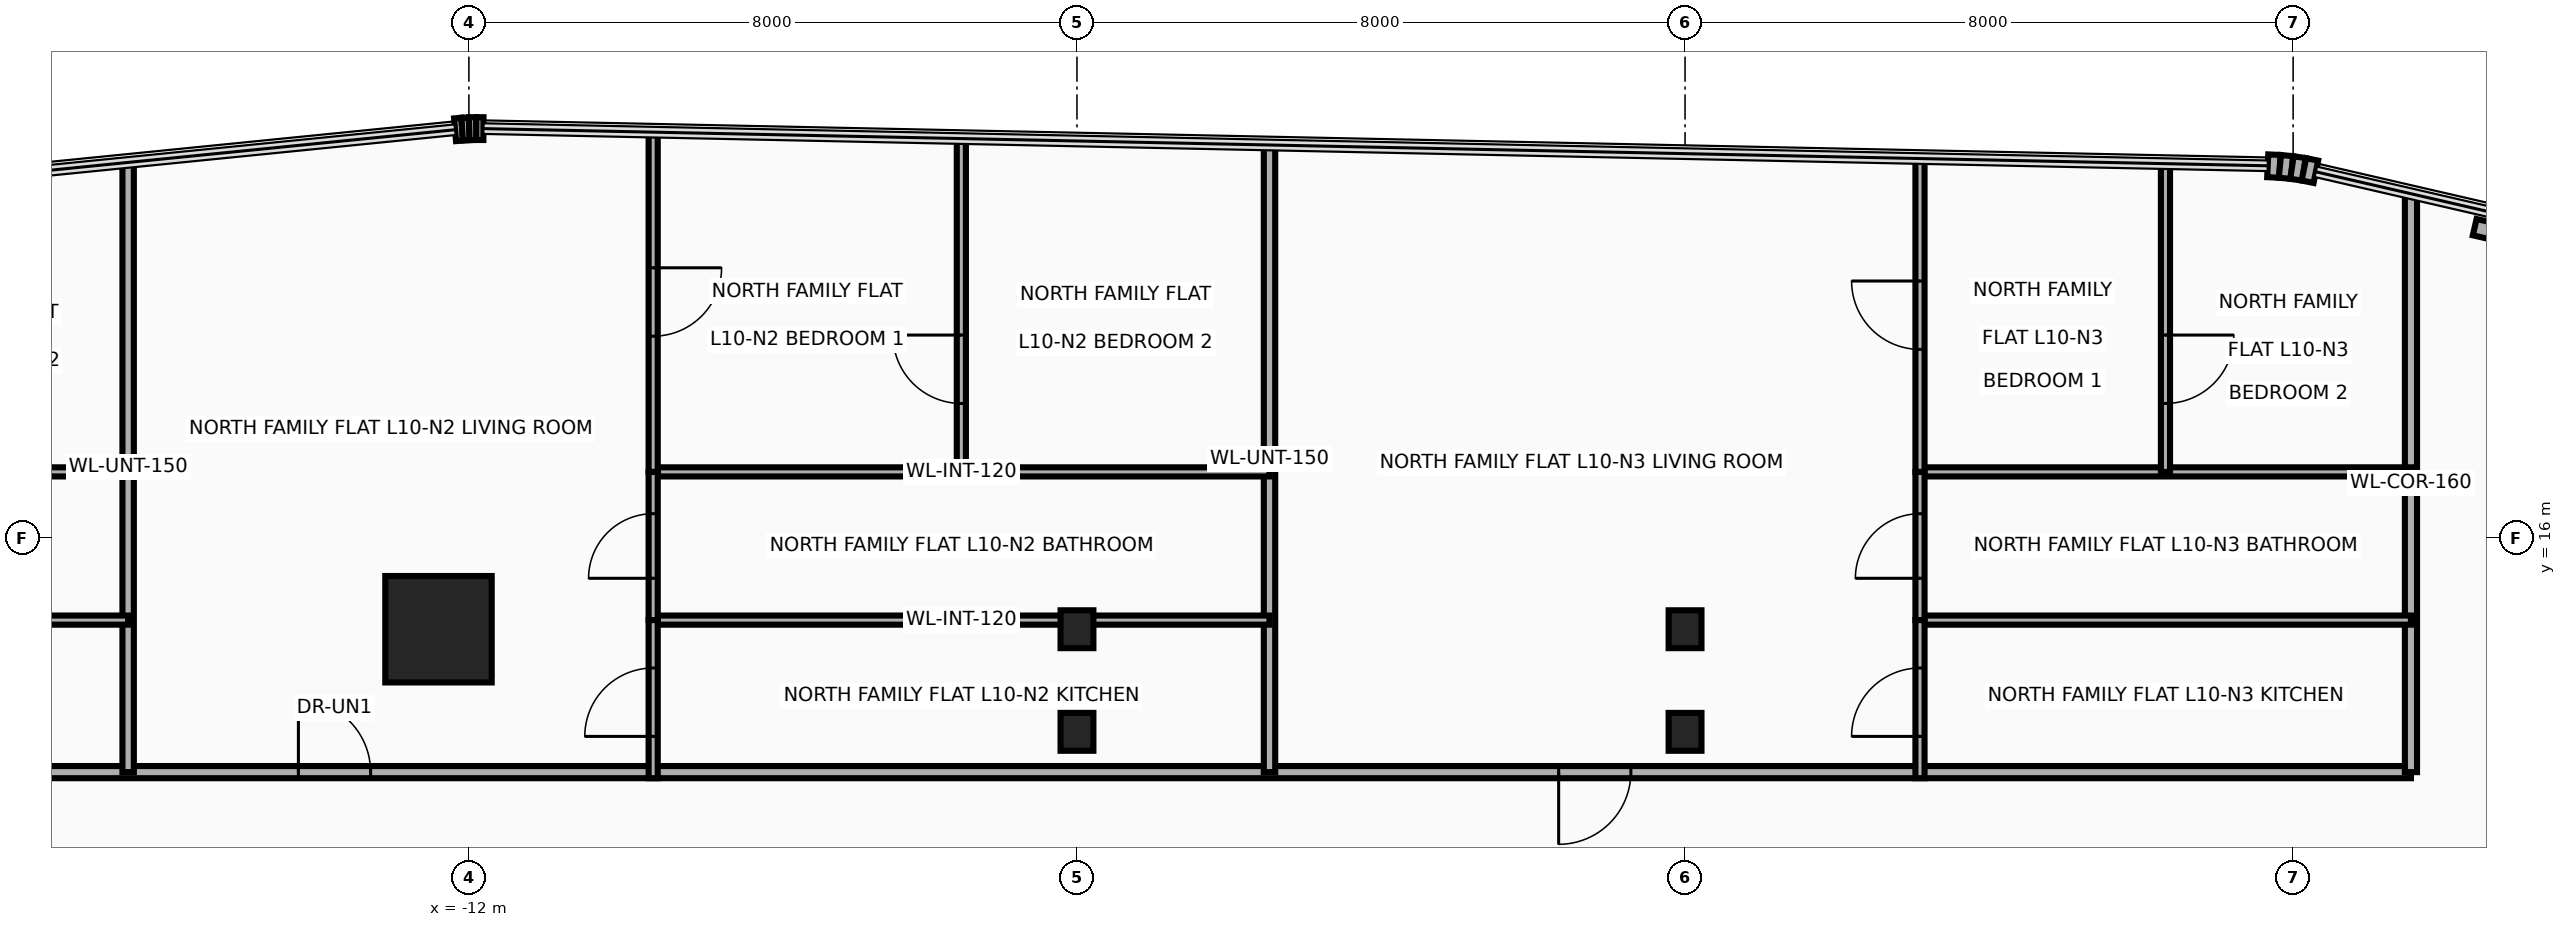
"""IFC4 building model, lengths in metres.
Left out: names, types, materials, properties, quantities, classifications, styles, units other than length and angle.
Written with IfcOpenShell. Run it as: python <this file> out.ifc"""

import sys

from ifc_helpers import new_model, si_unit, direction, frame, frame_2d, origin, origin_2d, place, context, subcontext, project, spatial, rectangle, i_section, extrude, source, transform, mapped, element, fill, save


model = new_model("IFC4")
c1 = context("Model", 3, precision=1e-05, world=origin(), true_north=direction((0.0, 1.0)))
c2 = subcontext(c1, "Body", "Model", "MODEL_VIEW")
j1 = project(units=[si_unit("LENGTHUNIT", "METRE"), si_unit("PLANEANGLEUNIT", "RADIAN")], contexts=[c1])
p1 = place(None, origin())
s1 = spatial("IfcSite", under=j1, at=p1, CompositionType="ELEMENT")
p2 = place(p1, origin())
s2 = spatial("IfcBuilding", under=s1, at=p2, CompositionType="ELEMENT")
p3 = place(p2, frame((0.0, 0.0, 44.5)))
s3 = spatial("IfcBuildingStorey", under=s2, at=p3, CompositionType="ELEMENT", Elevation=44.5)
m1 = source(origin(), c2, "Body", "SweptSolid", [
    extrude(rectangle(XDim=1.4, YDim=1.4, at=origin_2d()), origin(), (0.0, 0.0, 1.0), 3.7),
])
p4 = place(p3, frame((-12.4, 14.8, 0.0), z_axis=(0.0, 0.0, 1.0), x_axis=(1.0, 0.0, 0.0)))
e1 = element("IfcColumn", 1, at=p4, inside=s3, PredefinedType="COLUMN", context=c2, shape_type="MappedRepresentation", body=[
    mapped(m1, transform((0.0, 0.0, 0.0), x_axis=(1.0, 0.0, 0.0), y_axis=(0.0, 1.0, 0.0), z_axis=(0.0, 0.0, 1.0), scale=1.0)),
])
m2 = source(origin(), c2, "Body", "SweptSolid", [
    extrude(i_section(OverallWidth=0.432, OverallDepth=0.498, WebThickness=0.056, FlangeThickness=0.089, at=origin_2d()), origin(), (0.0, 0.0, 1.0), 3.7),
])
for number, where, z_axis, x_axis in (
    (2, (-4.0, 13.45, 0.0), (0.0, 0.0, 1.0), (1.0, 0.0, 0.0)),
    (3, (-4.0, 14.8, 0.0), (0.0, 0.0, 1.0), (1.0, 0.0, 0.0)),
    (4, (4.0, 13.45, 0.0), (0.0, 0.0, 1.0), (1.0, 0.0, 0.0)),
    (5, (4.0, 14.8, 0.0), (0.0, 0.0, 1.0), (1.0, 0.0, 0.0)),
):
    element("IfcColumn", number, at=place(p3, frame(where, z_axis=z_axis, x_axis=x_axis)), inside=s3, PredefinedType="COLUMN", context=c2, shape_type="MappedRepresentation", body=[
        mapped(m2, transform((0.0, 0.0, 0.0), x_axis=(1.0, 0.0, 0.0), y_axis=(0.0, 1.0, 0.0), z_axis=(0.0, 0.0, 1.0), scale=1.0)),
    ])
p5 = place(p3, frame((-12.182, 21.371, 0.0), z_axis=(0.0, 0.0, 1.0), x_axis=(0.996527790842, 0.08326080759, 0.0)))
e6 = element("IfcWall", 6, at=p5, inside=s3, PredefinedType="SOLIDWALL", context=c2, shape_type="SweptSolid", body=[
    extrude(rectangle(XDim=0.094, YDim=0.3, at=frame_2d((0.047, 0.0))), origin(), (0.0, 0.0, 1.0), 3.46),
])
p6 = place(p3, frame((-12.088, 21.379, 0.0), z_axis=(0.0, 0.0, 1.0), x_axis=(0.998476480444, 0.055178963393, 0.0)))
e7 = element("IfcWall", 7, at=p6, inside=s3, PredefinedType="SOLIDWALL", context=c2, shape_type="SweptSolid", body=[
    extrude(rectangle(XDim=0.093, YDim=0.3, at=frame_2d((0.046, 0.0))), origin(), (0.0, 0.0, 1.0), 3.46),
])
p7 = place(p3, frame((-11.996, 21.384, 0.0), z_axis=(0.0, 0.0, 1.0), x_axis=(0.999722573757, 0.023553673204, 0.0)))
e8 = element("IfcWall", 8, at=p7, inside=s3, PredefinedType="SOLIDWALL", context=c2, shape_type="SweptSolid", body=[
    extrude(rectangle(XDim=0.093, YDim=0.3, at=frame_2d((0.047, 0.0))), origin(), (0.0, 0.0, 1.0), 3.46),
])
p8 = place(p3, frame((-11.902, 21.386, 0.0), z_axis=(0.0, 0.0, 1.0), x_axis=(0.999986507273, -0.005194735103, 0.0)))
e9 = element("IfcWall", 9, at=p8, inside=s3, PredefinedType="SOLIDWALL", context=c2, shape_type="SweptSolid", body=[
    extrude(rectangle(XDim=0.094, YDim=0.3, at=frame_2d((0.047, 0.0))), origin(), (0.0, 0.0, 1.0), 3.46),
])
p9 = place(p3, frame((11.666, 20.897, 0.0), z_axis=(0.0, 0.0, 1.0), x_axis=(0.998885297239, -0.047203421059, 0.0)))
e10 = element("IfcWall", 10, at=p9, inside=s3, PredefinedType="SOLIDWALL", context=c2, shape_type="SweptSolid", body=[
    extrude(rectangle(XDim=0.16, YDim=0.3, at=frame_2d((0.08, 0.0))), origin(), (0.0, 0.0, 1.0), 3.46),
])
p10 = place(p3, frame((11.826, 20.889, 0.0), z_axis=(0.0, 0.0, 1.0), x_axis=(0.995172891136, -0.098137234257, 0.0)))
e11 = element("IfcWall", 11, at=p10, inside=s3, PredefinedType="SOLIDWALL", context=c2, shape_type="SweptSolid", body=[
    extrude(rectangle(XDim=0.159, YDim=0.3, at=frame_2d((0.08, 0.0))), origin(), (0.0, 0.0, 1.0), 3.46),
])
p11 = place(p3, frame((11.984, 20.874, 0.0), z_axis=(0.0, 0.0, 1.0), x_axis=(0.988846069207, -0.148941100486, 0.0)))
e12 = element("IfcWall", 12, at=p11, inside=s3, PredefinedType="SOLIDWALL", context=c2, shape_type="SweptSolid", body=[
    extrude(rectangle(XDim=0.159, YDim=0.3, at=frame_2d((0.08, 0.0))), origin(), (0.0, 0.0, 1.0), 3.46),
])
p12 = place(p3, frame((12.142, 20.85, 0.0), z_axis=(0.0, 0.0, 1.0), x_axis=(0.979991950448, -0.19903712482, 0.0)))
e13 = element("IfcWall", 13, at=p12, inside=s3, PredefinedType="SOLIDWALL", context=c2, shape_type="SweptSolid", body=[
    extrude(rectangle(XDim=0.161, YDim=0.3, at=frame_2d((0.08, 0.0))), origin(), (0.0, 0.0, 1.0), 3.46),
])
p13 = place(p3, frame((14.389, 20.09, 0.0), z_axis=(0.0, 0.0, 1.0), x_axis=(0.974400545997, -0.224818984875, 0.0)))
e14 = element("IfcWall", 14, at=p13, inside=s3, PredefinedType="SOLIDWALL", context=c2, shape_type="SweptSolid", body=[
    extrude(rectangle(XDim=2.2, YDim=0.22, at=frame_2d((1.1, 0.0))), origin(), (0.0, 0.0, 1.0), 3.46),
])
p14 = place(p13, frame((0.65, 0.0, 0.95)))
e15 = element("IfcOpeningElement", 15, at=p14, cuts=e14, PredefinedType="OPENING", context=c2, shape_type="SweptSolid", body=[
    extrude(rectangle(XDim=0.9, YDim=1.3, at=frame_2d((0.45, 0.65))), frame((0.0, 0.125, 0.0), z_axis=(0.0, -1.0, 0.0), x_axis=(1.0, 0.0, 0.0)), (0.0, 0.0, 1.0), 0.25),
])
p15 = place(p3, frame((-31.89, 12.92, 0.0), z_axis=(0.0, 0.0, 1.0), x_axis=(1.0, 0.0, 0.0)))
e16 = element("IfcWall", 16, at=p15, inside=s3, PredefinedType="PARTITIONING", context=c2, shape_type="SweptSolid", body=[
    extrude(rectangle(XDim=45.44, YDim=0.16, at=frame_2d((22.72, 0.0))), origin(), (0.0, 0.0, 1.0), 2.583),
])
p16 = place(p15, frame((3.069, 0.0, 0.0)))
e17 = element("IfcOpeningElement", 17, at=p16, cuts=e16, PredefinedType="OPENING", context=c2, shape_type="SweptSolid", body=[
    extrude(rectangle(XDim=0.95, YDim=2.15, at=frame_2d((0.475, 1.075))), frame((0.0, 0.095, 0.0), z_axis=(0.0, -1.0, 0.0), x_axis=(1.0, 0.0, 0.0)), (0.0, 0.0, 1.0), 0.19),
])
p17 = place(p15, frame((17.647, 0.0, 0.0)))
e18 = element("IfcOpeningElement", 18, at=p17, cuts=e16, PredefinedType="OPENING", context=c2, shape_type="SweptSolid", body=[
    extrude(rectangle(XDim=0.95, YDim=2.15, at=frame_2d((0.475, 1.075))), frame((0.0, 0.095, 0.0), z_axis=(0.0, -1.0, 0.0), x_axis=(1.0, 0.0, 0.0)), (0.0, 0.0, 1.0), 0.19),
])
p18 = place(p15, frame((34.227, 0.0, 0.0)))
e19 = element("IfcOpeningElement", 19, at=p18, cuts=e16, PredefinedType="OPENING", context=c2, shape_type="SweptSolid", body=[
    extrude(rectangle(XDim=0.95, YDim=2.15, at=frame_2d((0.475, 1.075))), frame((0.0, 0.095, 0.0), z_axis=(0.0, -1.0, 0.0), x_axis=(1.0, 0.0, 0.0)), (0.0, 0.0, 1.0), 0.19),
])
p19 = place(p3, frame((13.55, 12.92, 0.0), z_axis=(0.0, 0.0, 1.0), x_axis=(0.0, 1.0, 0.0)))
e20 = element("IfcWall", 20, at=p19, inside=s3, PredefinedType="PARTITIONING", context=c2, shape_type="SweptSolid", body=[
    extrude(rectangle(XDim=7.609, YDim=0.16, at=frame_2d((3.805, 0.0))), origin(), (0.0, 0.0, 1.0), 2.583),
])
p20 = place(p3, frame((-16.483, 12.92, 0.0), z_axis=(0.0, 0.0, 1.0), x_axis=(0.0, 1.0, 0.0)))
e21 = element("IfcWall", 21, at=p20, inside=s3, PredefinedType="PARTITIONING", context=c2, shape_type="SweptSolid", body=[
    extrude(rectangle(XDim=8.021, YDim=0.15, at=frame_2d((4.011, 0.0))), origin(), (0.0, 0.0, 1.0), 2.583),
])
p21 = place(p3, frame((-1.467, 12.92, 0.0), z_axis=(0.0, 0.0, 1.0), x_axis=(0.0, 1.0, 0.0)))
e22 = element("IfcWall", 22, at=p21, inside=s3, PredefinedType="PARTITIONING", context=c2, shape_type="SweptSolid", body=[
    extrude(rectangle(XDim=8.251, YDim=0.15, at=frame_2d((4.125, 0.0))), origin(), (0.0, 0.0, 1.0), 2.583),
])
p22 = place(p3, frame((-24.803, 14.92, 0.0), z_axis=(0.0, 0.0, 1.0), x_axis=(1.0, 0.0, 0.0)))
e23 = element("IfcWall", 23, at=p22, inside=s3, PredefinedType="PARTITIONING", context=c2, shape_type="SweptSolid", body=[
    extrude(rectangle(XDim=8.32, YDim=0.12, at=frame_2d((4.16, 0.0))), origin(), (0.0, 0.0, 1.0), 2.583),
])
p23 = place(p3, frame((-24.803, 16.87, 0.0), z_axis=(0.0, 0.0, 1.0), x_axis=(1.0, 0.0, 0.0)))
e24 = element("IfcWall", 24, at=p23, inside=s3, PredefinedType="PARTITIONING", context=c2, shape_type="SweptSolid", body=[
    extrude(rectangle(XDim=8.32, YDim=0.12, at=frame_2d((4.16, 0.0))), origin(), (0.0, 0.0, 1.0), 3.46),
])
p24 = place(p3, frame((-9.576, 14.92, 0.0), z_axis=(0.0, 0.0, 1.0), x_axis=(1.0, 0.0, 0.0)))
e25 = element("IfcWall", 25, at=p24, inside=s3, PredefinedType="PARTITIONING", context=c2, shape_type="SweptSolid", body=[
    extrude(rectangle(XDim=8.109, YDim=0.12, at=frame_2d((4.054, 0.0))), origin(), (0.0, 0.0, 1.0), 2.583),
])
p25 = place(p3, frame((-9.576, 16.87, 0.0), z_axis=(0.0, 0.0, 1.0), x_axis=(1.0, 0.0, 0.0)))
e26 = element("IfcWall", 26, at=p25, inside=s3, PredefinedType="PARTITIONING", context=c2, shape_type="SweptSolid", body=[
    extrude(rectangle(XDim=8.109, YDim=0.12, at=frame_2d((4.054, 0.0))), origin(), (0.0, 0.0, 1.0), 3.46),
])
p26 = place(p3, frame((-9.576, 14.92, 0.0), z_axis=(0.0, 0.0, 1.0), x_axis=(0.0, 1.0, 0.0)))
e27 = element("IfcWall", 27, at=p26, inside=s3, PredefinedType="PARTITIONING", context=c2, shape_type="SweptSolid", body=[
    extrude(rectangle(XDim=1.95, YDim=0.12, at=frame_2d((0.975, 0.0))), origin(), (0.0, 0.0, 1.0), 2.583),
])
p27 = place(p26, frame((0.55, 0.0, 0.0)))
e28 = element("IfcOpeningElement", 28, at=p27, cuts=e27, PredefinedType="OPENING", context=c2, shape_type="SweptSolid", body=[
    extrude(rectangle(XDim=0.85, YDim=2.1, at=frame_2d((0.425, 1.05))), frame((0.0, 0.075, 0.0), z_axis=(0.0, -1.0, 0.0), x_axis=(1.0, 0.0, 0.0)), (0.0, 0.0, 1.0), 0.15),
])
p28 = place(p3, frame((-9.576, 12.84, 0.0), z_axis=(0.0, 0.0, 1.0), x_axis=(0.0, 1.0, 0.0)))
e29 = element("IfcWall", 29, at=p28, inside=s3, PredefinedType="PARTITIONING", context=c2, shape_type="SweptSolid", body=[
    extrude(rectangle(XDim=2.08, YDim=0.12, at=frame_2d((1.04, 0.0))), origin(), (0.0, 0.0, 1.0), 2.583),
])
p29 = place(p28, frame((0.55, 0.0, 0.0)))
e30 = element("IfcOpeningElement", 30, at=p29, cuts=e29, PredefinedType="OPENING", context=c2, shape_type="SweptSolid", body=[
    extrude(rectangle(XDim=0.9, YDim=2.1, at=frame_2d((0.45, 1.05))), frame((0.0, 0.075, 0.0), z_axis=(0.0, -1.0, 0.0), x_axis=(1.0, 0.0, 0.0)), (0.0, 0.0, 1.0), 0.15),
])
p30 = place(p3, frame((-9.576, 16.87, 0.0), z_axis=(0.0, 0.0, 1.0), x_axis=(0.0, 1.0, 0.0)))
e31 = element("IfcWall", 31, at=p30, inside=s3, PredefinedType="PARTITIONING", context=c2, shape_type="SweptSolid", body=[
    extrude(rectangle(XDim=4.469, YDim=0.12, at=frame_2d((2.235, 0.0))), origin(), (0.0, 0.0, 1.0), 3.46),
])
p31 = place(p30, frame((1.785, 0.0, 0.0)))
e32 = element("IfcOpeningElement", 32, at=p31, cuts=e31, PredefinedType="OPENING", context=c2, shape_type="SweptSolid", body=[
    extrude(rectangle(XDim=0.9, YDim=2.1, at=frame_2d((0.45, 1.05))), frame((0.0, 0.075, 0.0), z_axis=(0.0, -1.0, 0.0), x_axis=(1.0, 0.0, 0.0)), (0.0, 0.0, 1.0), 0.15),
])
p32 = place(p3, frame((-5.521, 16.87, 0.0), z_axis=(0.0, 0.0, 1.0), x_axis=(0.0, 1.0, 0.0)))
e33 = element("IfcWall", 33, at=p32, inside=s3, PredefinedType="PARTITIONING", context=c2, shape_type="SweptSolid", body=[
    extrude(rectangle(XDim=4.385, YDim=0.12, at=frame_2d((2.192, 0.0))), origin(), (0.0, 0.0, 1.0), 3.46),
])
p33 = place(p32, frame((0.9, 0.0, 0.0)))
e34 = element("IfcOpeningElement", 34, at=p33, cuts=e33, PredefinedType="OPENING", context=c2, shape_type="SweptSolid", body=[
    extrude(rectangle(XDim=0.9, YDim=2.1, at=frame_2d((0.45, 1.05))), frame((0.0, 0.075, 0.0), z_axis=(0.0, -1.0, 0.0), x_axis=(1.0, 0.0, 0.0)), (0.0, 0.0, 1.0), 0.15),
])
for number, where, z_axis, x_axis in (
    (35, (7.091, 14.92, 0.0), (0.0, 0.0, 1.0), (1.0, 0.0, 0.0)),
    (36, (7.091, 16.87, 0.0), (0.0, 0.0, 1.0), (1.0, 0.0, 0.0)),
):
    element("IfcWall", number, at=place(p3, frame(where, z_axis=z_axis, x_axis=x_axis)), inside=s3, PredefinedType="PARTITIONING", context=c2, shape_type="SweptSolid", body=[
        extrude(rectangle(XDim=6.459, YDim=0.12, at=frame_2d((3.229, 0.0))), origin(), (0.0, 0.0, 1.0), 3.46),
    ])
p34 = place(p3, frame((7.091, 14.92, 0.0), z_axis=(0.0, 0.0, 1.0), x_axis=(0.0, 1.0, 0.0)))
e37 = element("IfcWall", 37, at=p34, inside=s3, PredefinedType="PARTITIONING", context=c2, shape_type="SweptSolid", body=[
    extrude(rectangle(XDim=1.95, YDim=0.12, at=frame_2d((0.975, 0.0))), origin(), (0.0, 0.0, 1.0), 3.46),
])
p35 = place(p34, frame((0.55, 0.0, 0.0)))
e38 = element("IfcOpeningElement", 38, at=p35, cuts=e37, PredefinedType="OPENING", context=c2, shape_type="SweptSolid", body=[
    extrude(rectangle(XDim=0.85, YDim=2.1, at=frame_2d((0.425, 1.05))), frame((0.0, 0.075, 0.0), z_axis=(0.0, -1.0, 0.0), x_axis=(1.0, 0.0, 0.0)), (0.0, 0.0, 1.0), 0.15),
])
p36 = place(p3, frame((7.091, 12.84, 0.0), z_axis=(0.0, 0.0, 1.0), x_axis=(0.0, 1.0, 0.0)))
e39 = element("IfcWall", 39, at=p36, inside=s3, PredefinedType="PARTITIONING", context=c2, shape_type="SweptSolid", body=[
    extrude(rectangle(XDim=2.08, YDim=0.12, at=frame_2d((1.04, 0.0))), origin(), (0.0, 0.0, 1.0), 2.583),
])
p37 = place(p36, frame((0.55, 0.0, 0.0)))
e40 = element("IfcOpeningElement", 40, at=p37, cuts=e39, PredefinedType="OPENING", context=c2, shape_type="SweptSolid", body=[
    extrude(rectangle(XDim=0.9, YDim=2.1, at=frame_2d((0.45, 1.05))), frame((0.0, 0.075, 0.0), z_axis=(0.0, -1.0, 0.0), x_axis=(1.0, 0.0, 0.0)), (0.0, 0.0, 1.0), 0.15),
])
p38 = place(p3, frame((7.091, 16.87, 0.0), z_axis=(0.0, 0.0, 1.0), x_axis=(0.0, 1.0, 0.0)))
e41 = element("IfcWall", 41, at=p38, inside=s3, PredefinedType="PARTITIONING", context=c2, shape_type="SweptSolid", body=[
    extrude(rectangle(XDim=4.122, YDim=0.12, at=frame_2d((2.061, 0.0))), origin(), (0.0, 0.0, 1.0), 3.46),
])
p39 = place(p38, frame((1.611, 0.0, 0.0)))
e42 = element("IfcOpeningElement", 42, at=p39, cuts=e41, PredefinedType="OPENING", context=c2, shape_type="SweptSolid", body=[
    extrude(rectangle(XDim=0.9, YDim=2.1, at=frame_2d((0.45, 1.05))), frame((0.0, 0.075, 0.0), z_axis=(0.0, -1.0, 0.0), x_axis=(1.0, 0.0, 0.0)), (0.0, 0.0, 1.0), 0.15),
])
p40 = place(p3, frame((10.32, 16.87, 0.0), z_axis=(0.0, 0.0, 1.0), x_axis=(0.0, 1.0, 0.0)))
e43 = element("IfcWall", 43, at=p40, inside=s3, PredefinedType="PARTITIONING", context=c2, shape_type="SweptSolid", body=[
    extrude(rectangle(XDim=4.055, YDim=0.12, at=frame_2d((2.027, 0.0))), origin(), (0.0, 0.0, 1.0), 3.46),
])
p41 = place(p40, frame((0.9, 0.0, 0.0)))
e44 = element("IfcOpeningElement", 44, at=p41, cuts=e43, PredefinedType="OPENING", context=c2, shape_type="SweptSolid", body=[
    extrude(rectangle(XDim=0.9, YDim=2.1, at=frame_2d((0.45, 1.05))), frame((0.0, 0.075, 0.0), z_axis=(0.0, -1.0, 0.0), x_axis=(1.0, 0.0, 0.0)), (0.0, 0.0, 1.0), 0.15),
])
p42 = place(p17, origin())
e45 = element("IfcDoor", 45, at=p42, inside=s3, OperationType="SINGLE_SWING_RIGHT", PredefinedType="DOOR", context=c2, shape_type="SweptSolid", body=[
    extrude(rectangle(XDim=0.95, YDim=2.15, at=frame_2d((0.475, 1.075))), frame((0.0, 0.025, 0.0), z_axis=(0.0, -1.0, 0.0), x_axis=(1.0, 0.0, 0.0)), (0.0, 0.0, 1.0), 0.05),
])
fill(e18, e45)
p43 = place(p27, origin())
e46 = element("IfcDoor", 46, at=p43, inside=s3, OperationType="SINGLE_SWING_LEFT", PredefinedType="DOOR", context=c2, shape_type="SweptSolid", body=[
    extrude(rectangle(XDim=0.85, YDim=2.1, at=frame_2d((0.425, 1.05))), frame((0.0, 0.025, 0.0), z_axis=(0.0, -1.0, 0.0), x_axis=(1.0, 0.0, 0.0)), (0.0, 0.0, 1.0), 0.05),
])
fill(e28, e46)
p44 = place(p29, origin())
e47 = element("IfcDoor", 47, at=p44, inside=s3, OperationType="SINGLE_SWING_RIGHT", PredefinedType="DOOR", context=c2, shape_type="SweptSolid", body=[
    extrude(rectangle(XDim=0.9, YDim=2.1, at=frame_2d((0.45, 1.05))), frame((0.0, 0.025, 0.0), z_axis=(0.0, -1.0, 0.0), x_axis=(1.0, 0.0, 0.0)), (0.0, 0.0, 1.0), 0.05),
])
fill(e30, e47)
p45 = place(p31, frame((0.9, 0.0, 0.0), z_axis=(0.0, 0.0, 1.0), x_axis=(-1.0, 0.0, 0.0)))
e48 = element("IfcDoor", 48, at=p45, inside=s3, OperationType="SINGLE_SWING_LEFT", PredefinedType="DOOR", context=c2, shape_type="SweptSolid", body=[
    extrude(rectangle(XDim=0.9, YDim=2.1, at=frame_2d((0.45, 1.05))), frame((0.0, 0.025, 0.0), z_axis=(0.0, -1.0, 0.0), x_axis=(1.0, 0.0, 0.0)), (0.0, 0.0, 1.0), 0.05),
])
fill(e32, e48)
p46 = place(p33, origin())
e49 = element("IfcDoor", 49, at=p46, inside=s3, OperationType="SINGLE_SWING_RIGHT", PredefinedType="DOOR", context=c2, shape_type="SweptSolid", body=[
    extrude(rectangle(XDim=0.9, YDim=2.1, at=frame_2d((0.45, 1.05))), frame((0.0, 0.025, 0.0), z_axis=(0.0, -1.0, 0.0), x_axis=(1.0, 0.0, 0.0)), (0.0, 0.0, 1.0), 0.05),
])
fill(e34, e49)
p47 = place(p18, frame((0.95, 0.0, 0.0), z_axis=(0.0, 0.0, 1.0), x_axis=(-1.0, 0.0, 0.0)))
e50 = element("IfcDoor", 50, at=p47, inside=s3, OperationType="SINGLE_SWING_LEFT", PredefinedType="DOOR", context=c2, shape_type="SweptSolid", body=[
    extrude(rectangle(XDim=0.95, YDim=2.15, at=frame_2d((0.475, 1.075))), frame((0.0, 0.025, 0.0), z_axis=(0.0, -1.0, 0.0), x_axis=(1.0, 0.0, 0.0)), (0.0, 0.0, 1.0), 0.05),
])
fill(e19, e50)
p48 = place(p35, origin())
e51 = element("IfcDoor", 51, at=p48, inside=s3, OperationType="SINGLE_SWING_RIGHT", PredefinedType="DOOR", context=c2, shape_type="SweptSolid", body=[
    extrude(rectangle(XDim=0.85, YDim=2.1, at=frame_2d((0.425, 1.05))), frame((0.0, 0.025, 0.0), z_axis=(0.0, -1.0, 0.0), x_axis=(1.0, 0.0, 0.0)), (0.0, 0.0, 1.0), 0.05),
])
fill(e38, e51)
p49 = place(p37, origin())
e52 = element("IfcDoor", 52, at=p49, inside=s3, OperationType="SINGLE_SWING_LEFT", PredefinedType="DOOR", context=c2, shape_type="SweptSolid", body=[
    extrude(rectangle(XDim=0.9, YDim=2.1, at=frame_2d((0.45, 1.05))), frame((0.0, 0.025, 0.0), z_axis=(0.0, -1.0, 0.0), x_axis=(1.0, 0.0, 0.0)), (0.0, 0.0, 1.0), 0.05),
])
fill(e40, e52)
p50 = place(p39, origin())
e53 = element("IfcDoor", 53, at=p50, inside=s3, OperationType="SINGLE_SWING_RIGHT", PredefinedType="DOOR", context=c2, shape_type="SweptSolid", body=[
    extrude(rectangle(XDim=0.9, YDim=2.1, at=frame_2d((0.45, 1.05))), frame((0.0, 0.025, 0.0), z_axis=(0.0, -1.0, 0.0), x_axis=(1.0, 0.0, 0.0)), (0.0, 0.0, 1.0), 0.05),
])
fill(e42, e53)
p51 = place(p41, frame((0.9, 0.0, 0.0), z_axis=(0.0, 0.0, 1.0), x_axis=(-1.0, 0.0, 0.0)))
e54 = element("IfcDoor", 54, at=p51, inside=s3, OperationType="SINGLE_SWING_LEFT", PredefinedType="DOOR", context=c2, shape_type="SweptSolid", body=[
    extrude(rectangle(XDim=0.9, YDim=2.1, at=frame_2d((0.45, 1.05))), frame((0.0, 0.025, 0.0), z_axis=(0.0, -1.0, 0.0), x_axis=(1.0, 0.0, 0.0)), (0.0, 0.0, 1.0), 0.05),
])
fill(e44, e54)
save(model, sys.argv[1])
